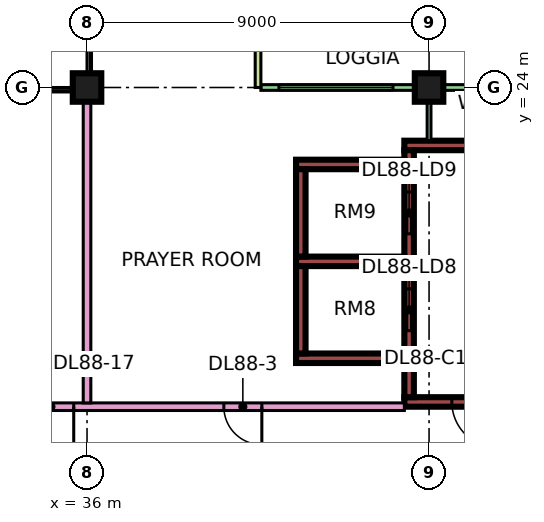
"""IFC4 building model, lengths in metres.
Left out: names, types, materials, properties, quantities, classifications, styles, units other than length and angle.
Written with IfcOpenShell. Run it as: python <this file> out.ifc"""

import sys

from ifc_helpers import new_model, si_unit, direction, frame, frame_2d, origin, origin_2d, place, context, subcontext, project, spatial, rectangle, extrude, element, fill, save


model = new_model("IFC4")
c1 = context("Model", 3, precision=1e-05, world=origin(), true_north=direction((0.0, 1.0)))
c2 = subcontext(c1, "Body", "Model", "MODEL_VIEW")
j1 = project(units=[si_unit("LENGTHUNIT", "METRE"), si_unit("PLANEANGLEUNIT", "RADIAN")], contexts=[c1])
p1 = place(None, origin())
s1 = spatial("IfcSite", under=j1, at=p1, CompositionType="ELEMENT")
p2 = place(p1, origin())
s2 = spatial("IfcBuilding", under=s1, at=p2, CompositionType="ELEMENT")
p3 = place(p2, frame((0.0, 0.0, 376.4)))
s3 = spatial("IfcBuildingStorey", under=s2, at=p3, CompositionType="ELEMENT", Elevation=376.4)
for number, where, z_axis, x_axis in (
    (1, (36.0, 24.0, 0.0), (0.0, 0.0, 1.0), (1.0, 0.0, 0.0)),
    (2, (45.0, 24.0, 0.0), (0.0, 0.0, 1.0), (1.0, 0.0, 0.0)),
):
    element("IfcColumn", number, at=place(p3, frame(where, z_axis=z_axis, x_axis=x_axis)), inside=s3, PredefinedType="COLUMN", context=c2, shape_type="SweptSolid", body=[
        extrude(rectangle(XDim=0.75, YDim=0.75, at=origin_2d()), origin(), (0.0, 0.0, 1.0), 3.75),
    ])
p4 = place(p3, frame((44.35, 15.725, 0.0), z_axis=(0.0, 0.0, 1.0), x_axis=(1.0, 0.0, 0.0)))
e3 = element("IfcWall", 3, at=p4, inside=s3, PredefinedType="SHEAR", context=c2, shape_type="SweptSolid", body=[
    extrude(rectangle(XDim=3.425, YDim=0.25, at=frame_2d((1.712, 0.0))), origin(), (0.0, 0.0, 1.0), 3.75),
])
p5 = place(p4, frame((1.25, 0.0, 0.0)))
e4 = element("IfcOpeningElement", 4, at=p5, cuts=e3, PredefinedType="OPENING", context=c2, shape_type="SweptSolid", body=[
    extrude(rectangle(XDim=1.2, YDim=2.2, at=frame_2d((0.6, 1.1))), frame((0.0, 0.135, 0.0), z_axis=(0.0, -1.0, 0.0), x_axis=(1.0, 0.0, 0.0)), (0.0, 0.0, 1.0), 0.27),
])
p6 = place(p3, frame((44.35, 22.475, 0.0), z_axis=(0.0, 0.0, 1.0), x_axis=(1.0, 0.0, 0.0)))
e5 = element("IfcWall", 5, at=p6, inside=s3, PredefinedType="SHEAR", context=c2, shape_type="SweptSolid", body=[
    extrude(rectangle(XDim=3.425, YDim=0.25, at=frame_2d((1.712, 0.0))), origin(), (0.0, 0.0, 1.0), 3.75),
])
p7 = place(p3, frame((44.475, 15.85, 0.0), z_axis=(0.0, 0.0, 1.0), x_axis=(0.0, 1.0, 0.0)))
e6 = element("IfcWall", 6, at=p7, inside=s3, PredefinedType="SHEAR", context=c2, shape_type="SweptSolid", body=[
    extrude(rectangle(XDim=6.5, YDim=0.25, at=frame_2d((3.25, 0.0))), origin(), (0.0, 0.0, 1.0), 3.75),
])
p8 = place(p7, frame((1.75, 0.0, 0.0)))
e7 = element("IfcOpeningElement", 7, at=p8, cuts=e6, PredefinedType="OPENING", context=c2, shape_type="SweptSolid", body=[
    extrude(rectangle(XDim=1.1, YDim=2.2, at=frame_2d((0.55, 1.1))), frame((0.0, 0.135, 0.0), z_axis=(0.0, -1.0, 0.0), x_axis=(1.0, 0.0, 0.0)), (0.0, 0.0, 1.0), 0.27),
])
p9 = place(p7, frame((4.3, 0.0, 0.0)))
e8 = element("IfcOpeningElement", 8, at=p9, cuts=e6, PredefinedType="OPENING", context=c2, shape_type="SweptSolid", body=[
    extrude(rectangle(XDim=1.1, YDim=2.2, at=frame_2d((0.55, 1.1))), frame((0.0, 0.135, 0.0), z_axis=(0.0, -1.0, 0.0), x_axis=(1.0, 0.0, 0.0)), (0.0, 0.0, 1.0), 0.27),
])
for number, where, z_axis, x_axis in (
    (9, (41.5, 16.875, 0.0), (0.0, 0.0, 1.0), (1.0, 0.0, 0.0)),
    (10, (41.5, 19.425, 0.0), (0.0, 0.0, 1.0), (1.0, 0.0, 0.0)),
    (11, (41.5, 21.975, 0.0), (0.0, 0.0, 1.0), (1.0, 0.0, 0.0)),
):
    element("IfcWall", number, at=place(p3, frame(where, z_axis=z_axis, x_axis=x_axis)), inside=s3, PredefinedType="SHEAR", context=c2, shape_type="SweptSolid", body=[
        extrude(rectangle(XDim=2.85, YDim=0.25, at=frame_2d((1.425, 0.0))), origin(), (0.0, 0.0, 1.0), 3.75),
    ])
for number, where, z_axis, x_axis in (
    (12, (41.625, 17.0, 0.0), (0.0, 0.0, 1.0), (0.0, 1.0, 0.0)),
    (13, (41.625, 19.55, 0.0), (0.0, 0.0, 1.0), (0.0, 1.0, 0.0)),
):
    element("IfcWall", number, at=place(p3, frame(where, z_axis=z_axis, x_axis=x_axis)), inside=s3, PredefinedType="SHEAR", context=c2, shape_type="SweptSolid", body=[
        extrude(rectangle(XDim=2.3, YDim=0.25, at=frame_2d((1.15, 0.0))), origin(), (0.0, 0.0, 1.0), 3.75),
    ])
p10 = place(p3, frame((47.925, 24.0, 0.0), z_axis=(0.0, 0.0, 1.0), x_axis=(-1.0, 0.0, 0.0)))
e14 = element("IfcWall", 14, at=p10, inside=s3, PredefinedType="SOLIDWALL", context=c2, shape_type="SweptSolid", body=[
    extrude(rectangle(XDim=7.35, YDim=0.15, at=frame_2d((3.675, 0.0))), origin(), (0.0, 0.0, 1.0), 3.35),
])
p11 = place(p10, frame((0.625, 0.0, 0.45)))
e15 = element("IfcOpeningElement", 15, at=p11, cuts=e14, PredefinedType="OPENING", context=c2, shape_type="SweptSolid", body=[
    extrude(rectangle(XDim=1.2, YDim=2.4, at=frame_2d((0.6, 1.2))), frame((0.0, 0.085, 0.0), z_axis=(0.0, -1.0, 0.0), x_axis=(1.0, 0.0, 0.0)), (0.0, 0.0, 1.0), 0.17),
])
p12 = place(p10, frame((3.875, 0.0, 0.45)))
e16 = element("IfcOpeningElement", 16, at=p12, cuts=e14, PredefinedType="OPENING", context=c2, shape_type="SweptSolid", body=[
    extrude(rectangle(XDim=3.0, YDim=2.4, at=frame_2d((1.5, 1.2))), frame((0.0, 0.085, 0.0), z_axis=(0.0, -1.0, 0.0), x_axis=(1.0, 0.0, 0.0)), (0.0, 0.0, 1.0), 0.17),
])
p13 = place(p3, frame((40.5, 25.5, 0.0), z_axis=(0.0, 0.0, 1.0), x_axis=(0.0, -1.0, 0.0)))
e17 = element("IfcWall", 17, at=p13, inside=s3, PredefinedType="SOLIDWALL", context=c2, shape_type="SweptSolid", body=[
    extrude(rectangle(XDim=1.5, YDim=0.15, at=frame_2d((0.75, 0.0))), origin(), (0.0, 0.0, 1.0), 3.35),
])
p14 = place(p3, frame((34.0, 15.6, 0.0), z_axis=(0.0, 0.0, 1.0), x_axis=(1.0, 0.0, 0.0)))
e18 = element("IfcWall", 18, at=p14, inside=s3, PredefinedType="PARTITIONING", context=c2, shape_type="SweptSolid", body=[
    extrude(rectangle(XDim=10.35, YDim=0.2, at=frame_2d((5.175, 0.0))), origin(), (0.0, 0.0, 1.0), 3.35),
])
p15 = place(p14, frame((5.6, 0.0, 0.0)))
e19 = element("IfcOpeningElement", 19, at=p15, cuts=e18, PredefinedType="OPENING", context=c2, shape_type="SweptSolid", body=[
    extrude(rectangle(XDim=1.0, YDim=2.1, at=frame_2d((0.5, 1.05))), frame((0.0, 0.11, 0.0), z_axis=(0.0, -1.0, 0.0), x_axis=(1.0, 0.0, 0.0)), (0.0, 0.0, 1.0), 0.22),
])
p16 = place(p14, frame((0.45, 0.0, 0.0)))
e20 = element("IfcOpeningElement", 20, at=p16, cuts=e18, PredefinedType="OPENING", context=c2, shape_type="SweptSolid", body=[
    extrude(rectangle(XDim=1.2, YDim=2.1, at=frame_2d((0.6, 1.05))), frame((0.0, 0.11, 0.0), z_axis=(0.0, -1.0, 0.0), x_axis=(1.0, 0.0, 0.0)), (0.0, 0.0, 1.0), 0.22),
])
p17 = place(p3, frame((36.0, 15.7, 0.0), z_axis=(0.0, 0.0, 1.0), x_axis=(0.0, 1.0, 0.0)))
e21 = element("IfcWall", 21, at=p17, inside=s3, PredefinedType="PARTITIONING", context=c2, shape_type="SweptSolid", body=[
    extrude(rectangle(XDim=8.3, YDim=0.2, at=frame_2d((4.15, 0.0))), origin(), (0.0, 0.0, 1.0), 3.35),
])
p18 = place(p3, frame((45.0, 22.6, 0.0), z_axis=(0.0, 0.0, 1.0), x_axis=(0.0, 1.0, 0.0)))
e22 = element("IfcWall", 22, at=p18, inside=s3, PredefinedType="PARTITIONING", context=c2, shape_type="SweptSolid", body=[
    extrude(rectangle(XDim=1.326, YDim=0.1, at=frame_2d((0.663, 0.0))), origin(), (0.0, 0.0, 1.0), 3.35),
])
p19 = place(p12, origin())
e23 = element("IfcWindow", 23, at=p19, inside=s3, PartitioningType="SINGLE_PANEL", PredefinedType="WINDOW", context=c2, shape_type="SweptSolid", body=[
    extrude(rectangle(XDim=3.0, YDim=2.4, at=frame_2d((1.5, 1.2))), frame((0.0, 0.03, 0.0), z_axis=(0.0, -1.0, 0.0), x_axis=(1.0, 0.0, 0.0)), (0.0, 0.0, 1.0), 0.06),
])
fill(e16, e23)
p20 = place(p5, origin())
e24 = element("IfcDoor", 24, at=p20, inside=s3, OperationType="SINGLE_SWING_RIGHT", PredefinedType="DOOR", context=c2, shape_type="SweptSolid", body=[
    extrude(rectangle(XDim=1.2, YDim=2.2, at=frame_2d((0.6, 1.1))), frame((0.0, 0.025, 0.0), z_axis=(0.0, -1.0, 0.0), x_axis=(1.0, 0.0, 0.0)), (0.0, 0.0, 1.0), 0.05),
])
fill(e4, e24)
p21 = place(p8, origin())
e25 = element("IfcDoor", 25, at=p21, inside=s3, OperationType="DOUBLE_DOOR_SLIDING", PredefinedType="DOOR", context=c2, shape_type="SweptSolid", body=[
    extrude(rectangle(XDim=1.1, YDim=2.2, at=frame_2d((0.55, 1.1))), frame((0.0, 0.025, 0.0), z_axis=(0.0, -1.0, 0.0), x_axis=(1.0, 0.0, 0.0)), (0.0, 0.0, 1.0), 0.05),
])
fill(e7, e25)
p22 = place(p9, origin())
e26 = element("IfcDoor", 26, at=p22, inside=s3, OperationType="DOUBLE_DOOR_SLIDING", PredefinedType="DOOR", context=c2, shape_type="SweptSolid", body=[
    extrude(rectangle(XDim=1.1, YDim=2.2, at=frame_2d((0.55, 1.1))), frame((0.0, 0.025, 0.0), z_axis=(0.0, -1.0, 0.0), x_axis=(1.0, 0.0, 0.0)), (0.0, 0.0, 1.0), 0.05),
])
fill(e8, e26)
p23 = place(p15, origin())
e27 = element("IfcDoor", 27, at=p23, inside=s3, OperationType="SINGLE_SWING_RIGHT", PredefinedType="DOOR", context=c2, shape_type="SweptSolid", body=[
    extrude(rectangle(XDim=1.0, YDim=2.1, at=frame_2d((0.5, 1.05))), frame((0.0, 0.025, 0.0), z_axis=(0.0, -1.0, 0.0), x_axis=(1.0, 0.0, 0.0)), (0.0, 0.0, 1.0), 0.05),
])
fill(e19, e27)
p24 = place(p16, origin())
e28 = element("IfcDoor", 28, at=p24, inside=s3, OperationType="SINGLE_SWING_RIGHT", PredefinedType="DOOR", context=c2, shape_type="SweptSolid", body=[
    extrude(rectangle(XDim=1.2, YDim=2.1, at=frame_2d((0.6, 1.05))), frame((0.0, 0.025, 0.0), z_axis=(0.0, -1.0, 0.0), x_axis=(1.0, 0.0, 0.0)), (0.0, 0.0, 1.0), 0.05),
])
fill(e20, e28)
save(model, sys.argv[1])
